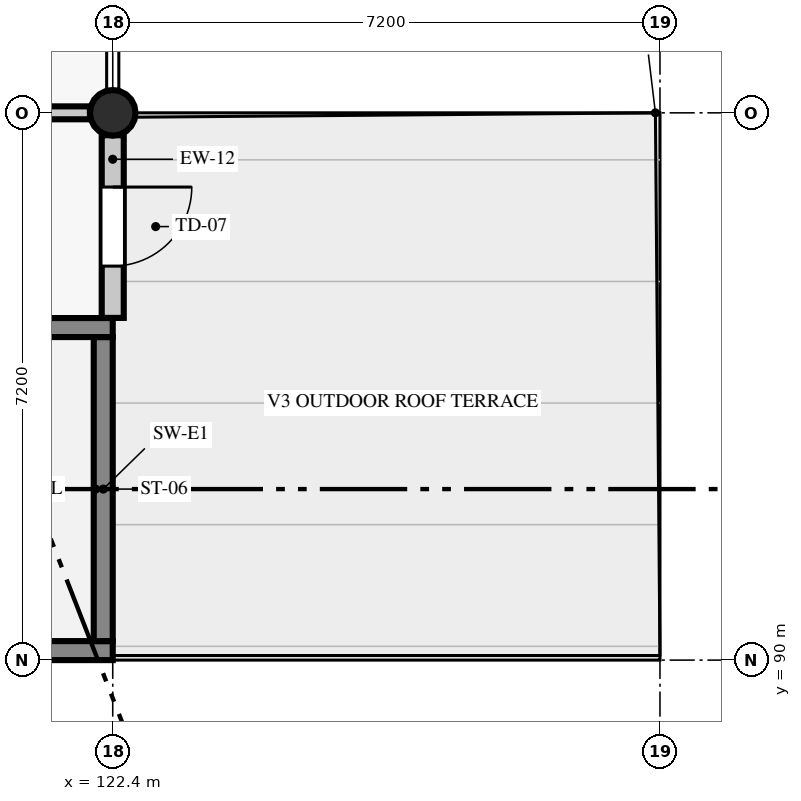
"""IFC4 building model, lengths in metres.
Left out: names, types, materials, properties, quantities, classifications, styles, units other than length and angle.
Written with IfcOpenShell. Run it as: python <this file> out.ifc"""

import sys

from ifc_helpers import new_model, si_unit, direction, frame, frame_2d, origin, origin_2d, place, context, subcontext, project, spatial, rectangle, circle, extrude, element, fill, save


model = new_model("IFC4")
c1 = context("Model", 3, precision=1e-05, world=origin(), true_north=direction((0.0, 1.0)))
c2 = subcontext(c1, "Body", "Model", "MODEL_VIEW")
j1 = project(units=[si_unit("LENGTHUNIT", "METRE"), si_unit("PLANEANGLEUNIT", "RADIAN")], contexts=[c1])
p1 = place(None, origin())
s1 = spatial("IfcSite", under=j1, at=p1, CompositionType="ELEMENT")
p2 = place(p1, origin())
s2 = spatial("IfcBuilding", under=s1, at=p2, CompositionType="ELEMENT")
p3 = place(p2, frame((0.0, 0.0, 13.8)))
s3 = spatial("IfcBuildingStorey", under=s2, at=p3, CompositionType="ELEMENT", Elevation=13.8)
p4 = place(p3, frame((122.4, 97.2, 0.0), z_axis=(0.0, 0.0, 1.0), x_axis=(1.0, 0.0, 0.0)))
e1 = element("IfcColumn", 1, at=p4, inside=s3, PredefinedType="COLUMN", context=c2, shape_type="SweptSolid", body=[
    extrude(circle(Radius=0.3, at=origin_2d()), origin(), (0.0, 0.0, 1.0), 3.92),
])
p5 = place(p3, frame((122.4, 94.502, 0.0), z_axis=(0.0, 0.0, 1.0), x_axis=(0.0, 1.0, 0.0)))
e2 = element("IfcWall", 2, at=p5, inside=s3, PredefinedType="STANDARD", context=c2, shape_type="SweptSolid", body=[
    extrude(rectangle(XDim=2.403, YDim=0.29, at=frame_2d((1.202, 0.0))), origin(), (0.0, 0.0, 1.0), 3.92),
])
p6 = place(p5, frame((0.681, 0.0, 0.0)))
e3 = element("IfcOpeningElement", 3, at=p6, cuts=e2, PredefinedType="OPENING", context=c2, shape_type="SweptSolid", body=[
    extrude(rectangle(XDim=1.04, YDim=2.1, at=frame_2d((0.52, 1.05))), frame((0.0, 0.155, 0.0), z_axis=(0.0, -1.0, 0.0), x_axis=(1.0, 0.0, 0.0)), (0.0, 0.0, 1.0), 0.31),
])
p7 = place(p3, frame((113.6, 90.125, 0.0), z_axis=(0.0, 0.0, 1.0), x_axis=(1.0, 0.0, 0.0)))
e4 = element("IfcWall", 4, at=p7, inside=s3, PredefinedType="SHEAR", context=c2, shape_type="SweptSolid", body=[
    extrude(rectangle(XDim=8.8, YDim=0.25, at=frame_2d((4.4, 0.0))), origin(), (0.0, 0.0, 1.0), 3.92),
])
p8 = place(p7, frame((0.35, 0.0, 0.92)))
e5 = element("IfcOpeningElement", 5, at=p8, cuts=e4, PredefinedType="OPENING", context=c2, shape_type="SweptSolid", body=[
    extrude(rectangle(XDim=1.18, YDim=1.48, at=frame_2d((0.59, 0.74))), frame((0.0, 0.135, 0.0), z_axis=(0.0, -1.0, 0.0), x_axis=(1.0, 0.0, 0.0)), (0.0, 0.0, 1.0), 0.27),
])
p9 = place(p3, frame((122.275, 90.25, 0.0), z_axis=(0.0, 0.0, 1.0), x_axis=(0.0, 1.0, 0.0)))
e6 = element("IfcWall", 6, at=p9, inside=s3, PredefinedType="SHEAR", context=c2, shape_type="SweptSolid", body=[
    extrude(rectangle(XDim=4.0, YDim=0.25, at=frame_2d((2.0, 0.0))), origin(), (0.0, 0.0, 1.0), 3.92),
])
p10 = place(p3, frame((122.4, 94.375, 0.0), z_axis=(0.0, 0.0, 1.0), x_axis=(-1.0, 0.0, 0.0)))
e7 = element("IfcWall", 7, at=p10, inside=s3, PredefinedType="SHEAR", context=c2, shape_type="SweptSolid", body=[
    extrude(rectangle(XDim=8.8, YDim=0.25, at=frame_2d((4.4, 0.0))), origin(), (0.0, 0.0, 1.0), 3.92),
])
p11 = place(p10, frame((7.0, 0.0, 0.0)))
e8 = element("IfcOpeningElement", 8, at=p11, cuts=e7, PredefinedType="OPENING", context=c2, shape_type="SweptSolid", body=[
    extrude(rectangle(XDim=1.5, YDim=2.15, at=frame_2d((0.75, 1.075))), frame((0.0, 0.135, 0.0), z_axis=(0.0, -1.0, 0.0), x_axis=(1.0, 0.0, 0.0)), (0.0, 0.0, 1.0), 0.27),
])
p12 = place(p3, frame((93.9, 97.2, 0.0), z_axis=(0.0, 0.0, 1.0), x_axis=(1.0, 0.0, 0.0)))
e9 = element("IfcWall", 9, at=p12, inside=s3, PredefinedType="PARTITIONING", context=c2, shape_type="SweptSolid", body=[
    extrude(rectangle(XDim=28.2, YDim=0.17, at=frame_2d((14.1, 0.0))), origin(), (0.0, 0.0, 1.0), 3.17),
])
p13 = place(p12, frame((2.473, 0.0, 0.0)))
e10 = element("IfcOpeningElement", 10, at=p13, cuts=e9, PredefinedType="OPENING", context=c2, shape_type="SweptSolid", body=[
    extrude(rectangle(XDim=1.74, YDim=2.26, at=frame_2d((0.87, 1.13))), frame((0.0, 0.095, 0.0), z_axis=(0.0, -1.0, 0.0), x_axis=(1.0, 0.0, 0.0)), (0.0, 0.0, 1.0), 0.19),
])
p14 = place(p12, frame((7.88, 0.0, 0.0)))
e11 = element("IfcOpeningElement", 11, at=p14, cuts=e9, PredefinedType="OPENING", context=c2, shape_type="SweptSolid", body=[
    extrude(rectangle(XDim=0.92, YDim=2.18, at=frame_2d((0.46, 1.09))), frame((0.0, 0.095, 0.0), z_axis=(0.0, -1.0, 0.0), x_axis=(1.0, 0.0, 0.0)), (0.0, 0.0, 1.0), 0.19),
])
p15 = place(p12, frame((10.0, 0.0, 0.0)))
e12 = element("IfcOpeningElement", 12, at=p15, cuts=e9, PredefinedType="OPENING", context=c2, shape_type="SweptSolid", body=[
    extrude(rectangle(XDim=0.94, YDim=2.08, at=frame_2d((0.47, 1.04))), frame((0.0, 0.095, 0.0), z_axis=(0.0, -1.0, 0.0), x_axis=(1.0, 0.0, 0.0)), (0.0, 0.0, 1.0), 0.19),
])
p16 = place(p12, frame((12.21, 0.0, 0.0)))
e13 = element("IfcOpeningElement", 13, at=p16, cuts=e9, PredefinedType="OPENING", context=c2, shape_type="SweptSolid", body=[
    extrude(rectangle(XDim=0.9, YDim=2.08, at=frame_2d((0.45, 1.04))), frame((0.0, 0.095, 0.0), z_axis=(0.0, -1.0, 0.0), x_axis=(1.0, 0.0, 0.0)), (0.0, 0.0, 1.0), 0.19),
])
p17 = place(p12, frame((15.56, 0.0, 0.0)))
e14 = element("IfcOpeningElement", 14, at=p17, cuts=e9, PredefinedType="OPENING", context=c2, shape_type="SweptSolid", body=[
    extrude(rectangle(XDim=1.2, YDim=2.23, at=frame_2d((0.6, 1.115))), frame((0.0, 0.095, 0.0), z_axis=(0.0, -1.0, 0.0), x_axis=(1.0, 0.0, 0.0)), (0.0, 0.0, 1.0), 0.19),
])
p18 = place(p12, frame((17.64, 0.0, 0.0)))
e15 = element("IfcOpeningElement", 15, at=p18, cuts=e9, PredefinedType="OPENING", context=c2, shape_type="SweptSolid", body=[
    extrude(rectangle(XDim=0.9, YDim=2.08, at=frame_2d((0.45, 1.04))), frame((0.0, 0.095, 0.0), z_axis=(0.0, -1.0, 0.0), x_axis=(1.0, 0.0, 0.0)), (0.0, 0.0, 1.0), 0.19),
])
p19 = place(p12, frame((24.254, 0.0, 0.0)))
e16 = element("IfcOpeningElement", 16, at=p19, cuts=e9, PredefinedType="OPENING", context=c2, shape_type="SweptSolid", body=[
    extrude(rectangle(XDim=0.94, YDim=2.08, at=frame_2d((0.47, 1.04))), frame((0.0, 0.095, 0.0), z_axis=(0.0, -1.0, 0.0), x_axis=(1.0, 0.0, 0.0)), (0.0, 0.0, 1.0), 0.19),
])
p20 = place(p6, frame((1.04, 0.0, 0.0), z_axis=(0.0, 0.0, 1.0), x_axis=(-1.0, 0.0, 0.0)))
e17 = element("IfcDoor", 17, at=p20, inside=s3, OperationType="SINGLE_SWING_LEFT", PredefinedType="DOOR", context=c2, shape_type="SweptSolid", body=[
    extrude(rectangle(XDim=1.04, YDim=2.1, at=frame_2d((0.52, 1.05))), frame((0.0, 0.025, 0.0), z_axis=(0.0, -1.0, 0.0), x_axis=(1.0, 0.0, 0.0)), (0.0, 0.0, 1.0), 0.05),
])
fill(e3, e17)
save(model, sys.argv[1])
